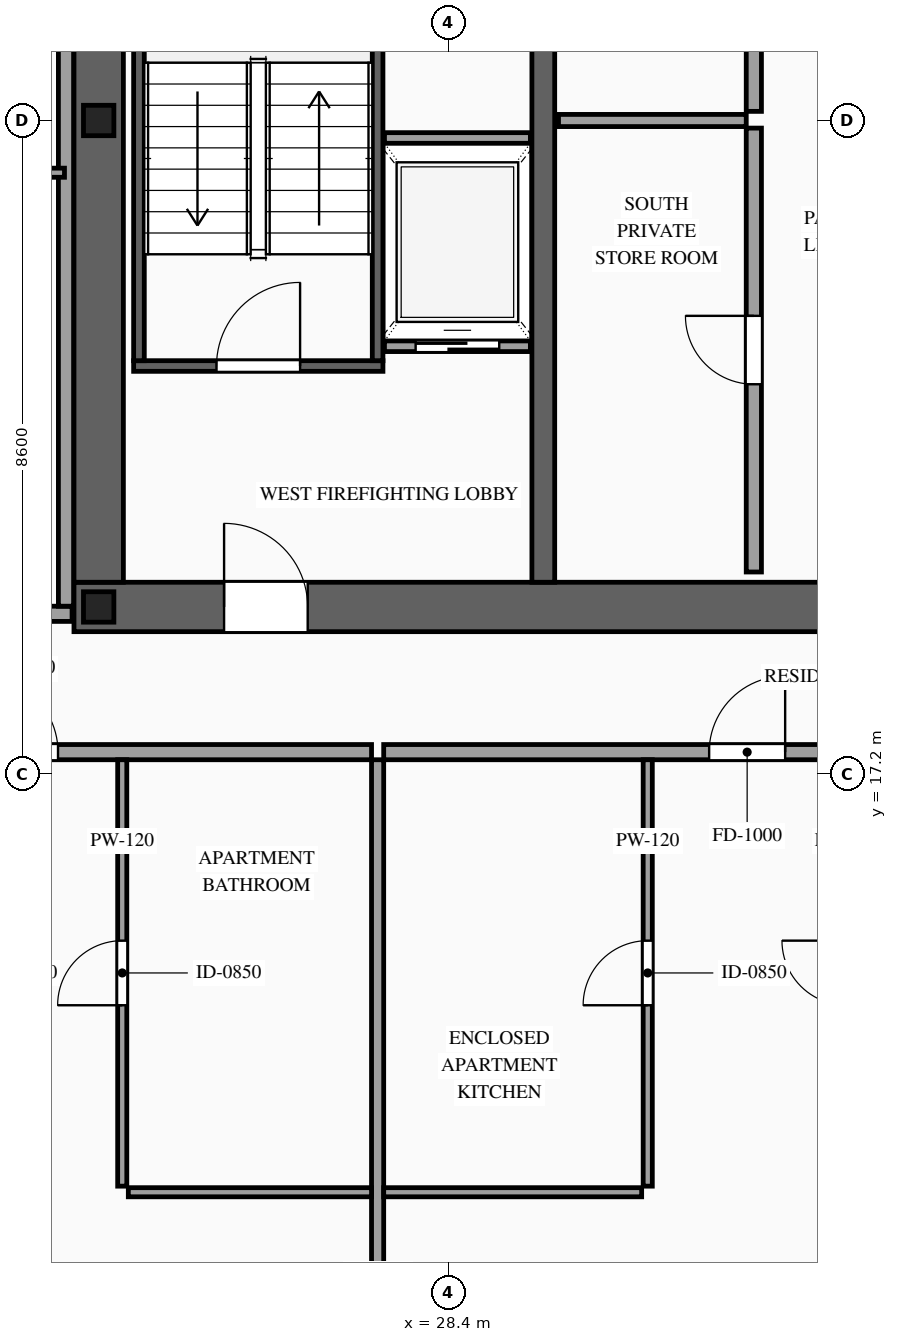
"""IFC4 building model, lengths in metres.
Left out: names, types, materials, properties, quantities, classifications, styles, units other than length and angle.
Written with IfcOpenShell. Run it as: python <this file> out.ifc"""

import sys

from ifc_helpers import new_model, si_unit, direction, frame, frame_2d, origin, origin_2d, place, context, subcontext, project, spatial, rectangle, i_section, extrude, source, transform, mapped, element, fill, save


model = new_model("IFC4")
c1 = context("Model", 3, precision=1e-05, world=origin(), true_north=direction((0.0, 1.0)))
c2 = subcontext(c1, "Body", "Model", "MODEL_VIEW")
j1 = project(units=[si_unit("LENGTHUNIT", "METRE"), si_unit("PLANEANGLEUNIT", "RADIAN")], contexts=[c1])
p1 = place(None, origin())
s1 = spatial("IfcSite", under=j1, at=p1, CompositionType="ELEMENT")
p2 = place(p1, origin())
s2 = spatial("IfcBuilding", under=s1, at=p2, CompositionType="ELEMENT")
p3 = place(p2, frame((0.0, 0.0, 184.5)))
s3 = spatial("IfcBuildingStorey", under=s2, at=p3, CompositionType="ELEMENT", Elevation=184.5)
p4 = place(p3, frame((23.475, 19.4, 0.0), z_axis=(0.0, 0.0, 1.0), x_axis=(1.0, 0.0, 0.0)))
e1 = element("IfcWall", 1, at=p4, inside=s3, PredefinedType="SHEAR", context=c2, shape_type="SweptSolid", body=[
    extrude(rectangle(XDim=27.05, YDim=0.65, at=frame_2d((13.525, 0.0))), origin(), (0.0, 0.0, 1.0), 3.5),
])
p5 = place(p4, frame((1.975, 0.0, 0.0)))
e2 = element("IfcOpeningElement", 2, at=p5, cuts=e1, PredefinedType="OPENING", context=c2, shape_type="SweptSolid", body=[
    extrude(rectangle(XDim=1.1, YDim=2.2, at=frame_2d((0.55, 1.1))), frame((0.0, 0.34, 0.0), z_axis=(0.0, -1.0, 0.0), x_axis=(1.0, 0.0, 0.0)), (0.0, 0.0, 1.0), 0.68),
])
p6 = place(p4, frame((9.875, 0.0, 0.0)))
e3 = element("IfcOpeningElement", 3, at=p6, cuts=e1, PredefinedType="OPENING", context=c2, shape_type="SweptSolid", body=[
    extrude(rectangle(XDim=1.1, YDim=2.2, at=frame_2d((0.55, 1.1))), frame((0.0, 0.34, 0.0), z_axis=(0.0, -1.0, 0.0), x_axis=(1.0, 0.0, 0.0)), (0.0, 0.0, 1.0), 0.68),
])
p7 = place(p4, frame((23.075, 0.0, 0.0)))
e4 = element("IfcOpeningElement", 4, at=p7, cuts=e1, PredefinedType="OPENING", context=c2, shape_type="SweptSolid", body=[
    extrude(rectangle(XDim=1.1, YDim=2.2, at=frame_2d((0.55, 1.1))), frame((0.0, 0.34, 0.0), z_axis=(0.0, -1.0, 0.0), x_axis=(1.0, 0.0, 0.0)), (0.0, 0.0, 1.0), 0.68),
])
p8 = place(p4, frame((19.695, 0.0, 0.0)))
e5 = element("IfcOpeningElement", 5, at=p8, cuts=e1, PredefinedType="OPENING", context=c2, shape_type="SweptSolid", body=[
    extrude(rectangle(XDim=0.9, YDim=2.15, at=frame_2d((0.45, 1.075))), frame((0.0, 0.34, 0.0), z_axis=(0.0, -1.0, 0.0), x_axis=(1.0, 0.0, 0.0)), (0.0, 0.0, 1.0), 0.68),
])
p9 = place(p4, frame((18.255, 0.0, 0.0)))
e6 = element("IfcOpeningElement", 6, at=p9, cuts=e1, PredefinedType="OPENING", context=c2, shape_type="SweptSolid", body=[
    extrude(rectangle(XDim=0.9, YDim=2.15, at=frame_2d((0.45, 1.075))), frame((0.0, 0.34, 0.0), z_axis=(0.0, -1.0, 0.0), x_axis=(1.0, 0.0, 0.0)), (0.0, 0.0, 1.0), 0.68),
])
m1 = source(origin(), c2, "Body", "SweptSolid", [
    extrude(rectangle(XDim=12.15, YDim=0.65, at=frame_2d((6.075, 0.0))), origin(), (0.0, 0.0, 1.0), 3.5),
])
p10 = place(p3, frame((23.8, 19.725, 0.0), z_axis=(0.0, 0.0, 1.0), x_axis=(0.0, 1.0, 0.0)))
e7 = element("IfcWall", 7, at=p10, inside=s3, PredefinedType="SHEAR", context=c2, shape_type="MappedRepresentation", body=[
    mapped(m1, transform((0.0, 0.0, 0.0), scale=1.0)),
])
m2 = source(origin(), c2, "Body", "SweptSolid", [
    extrude(rectangle(XDim=12.15, YDim=0.3, at=frame_2d((6.075, 0.0))), origin(), (0.0, 0.0, 1.0), 3.5),
])
p11 = place(p3, frame((29.65, 19.725, 0.0), z_axis=(0.0, 0.0, 1.0), x_axis=(0.0, 1.0, 0.0)))
e8 = element("IfcWall", 8, at=p11, inside=s3, PredefinedType="SOLIDWALL", context=c2, shape_type="MappedRepresentation", body=[
    mapped(m2, transform((0.0, 0.0, 0.0), scale=1.0)),
])
m3 = source(origin(), c2, "Body", "SweptSolid", [
    extrude(i_section(OverallWidth=0.4, OverallDepth=0.4, WebThickness=0.013, FlangeThickness=0.021, at=origin_2d()), origin(), (0.0, 0.0, 1.0), 3.5),
])
for number, where, z_axis, x_axis in (
    (9, (23.8, 19.4, 0.0), (0.0, 0.0, 1.0), (1.0, 0.0, 0.0)),
    (10, (23.8, 25.8, 0.0), (0.0, 0.0, 1.0), (1.0, 0.0, 0.0)),
):
    element("IfcColumn", number, at=place(p3, frame(where, z_axis=z_axis, x_axis=x_axis)), inside=s3, PredefinedType="COLUMN", context=c2, shape_type="MappedRepresentation", body=[
        mapped(m3, transform((0.0, 0.0, 0.0), scale=1.0)),
    ])
p12 = place(p3, frame((27.56, 22.83, 0.0), z_axis=(0.0, 0.0, 1.0), x_axis=(1.0, 0.0, 0.0)))
e11 = element("IfcWall", 11, at=p12, inside=s3, PredefinedType="SOLIDWALL", context=c2, shape_type="SweptSolid", body=[
    extrude(rectangle(XDim=1.92, YDim=0.14, at=frame_2d((0.96, 0.0))), origin(), (0.0, 0.0, 1.0), 3.28),
])
p13 = place(p12, frame((0.41, 0.0, 0.0)))
e12 = element("IfcOpeningElement", 12, at=p13, cuts=e11, PredefinedType="OPENING", context=c2, shape_type="SweptSolid", body=[
    extrude(rectangle(XDim=1.1, YDim=2.2, at=frame_2d((0.55, 1.1))), frame((0.0, 0.085, 0.0), z_axis=(0.0, -1.0, 0.0), x_axis=(1.0, 0.0, 0.0)), (0.0, 0.0, 1.0), 0.17),
])
m4 = source(origin(), c2, "Body", "SweptSolid", [
    extrude(rectangle(XDim=1.92, YDim=0.14, at=frame_2d((0.96, 0.0))), origin(), (0.0, 0.0, 1.0), 3.28),
])
p14 = place(p3, frame((27.56, 25.57, 0.0), z_axis=(0.0, 0.0, 1.0), x_axis=(1.0, 0.0, 0.0)))
e13 = element("IfcWall", 13, at=p14, inside=s3, PredefinedType="SOLIDWALL", context=c2, shape_type="MappedRepresentation", body=[
    mapped(m4, transform((0.0, 0.0, 0.0), scale=1.0)),
])
p15 = place(p3, frame((24.26, 22.57, 0.0), z_axis=(0.0, 0.0, 1.0), x_axis=(1.0, 0.0, 0.0)))
e14 = element("IfcWall", 14, at=p15, inside=s3, PredefinedType="SOLIDWALL", context=c2, shape_type="SweptSolid", body=[
    extrude(rectangle(XDim=3.28, YDim=0.14, at=frame_2d((1.64, 0.0))), origin(), (0.0, 0.0, 1.0), 3.28),
])
p16 = place(p15, frame((1.09, 0.0, 0.0)))
e15 = element("IfcOpeningElement", 15, at=p16, cuts=e14, PredefinedType="OPENING", context=c2, shape_type="SweptSolid", body=[
    extrude(rectangle(XDim=1.1, YDim=2.2, at=frame_2d((0.55, 1.1))), frame((0.0, 0.085, 0.0), z_axis=(0.0, -1.0, 0.0), x_axis=(1.0, 0.0, 0.0)), (0.0, 0.0, 1.0), 0.17),
])
m5 = source(origin(), c2, "Body", "SweptSolid", [
    extrude(rectangle(XDim=8.94, YDim=0.14, at=frame_2d((4.47, 0.0))), origin(), (0.0, 0.0, 1.0), 3.28),
])
for number, where, z_axis, x_axis in (
    (16, (24.33, 22.64, 0.0), (0.0, 0.0, 1.0), (0.0, 1.0, 0.0)),
    (17, (27.47, 22.64, 0.0), (0.0, 0.0, 1.0), (0.0, 1.0, 0.0)),
):
    element("IfcWall", number, at=place(p3, frame(where, z_axis=z_axis, x_axis=x_axis)), inside=s3, PredefinedType="SOLIDWALL", context=c2, shape_type="MappedRepresentation", body=[
        mapped(m5, transform((0.0, 0.0, 0.0), scale=1.0)),
    ])
p17 = place(p3, frame((32.42, 19.86, 0.0), z_axis=(0.0, 0.0, 1.0), x_axis=(0.0, 1.0, 0.0)))
e18 = element("IfcWall", 18, at=p17, inside=s3, PredefinedType="PARTITIONING", context=c2, shape_type="SweptSolid", body=[
    extrude(rectangle(XDim=5.84, YDim=0.2, at=frame_2d((2.92, 0.0))), origin(), (0.0, 0.0, 1.0), 3.28),
])
p18 = place(p17, frame((2.47, 0.0, 0.0)))
e19 = element("IfcOpeningElement", 19, at=p18, cuts=e18, PredefinedType="OPENING", context=c2, shape_type="SweptSolid", body=[
    extrude(rectangle(XDim=0.9, YDim=2.15, at=frame_2d((0.45, 1.075))), frame((0.0, 0.115, 0.0), z_axis=(0.0, -1.0, 0.0), x_axis=(1.0, 0.0, 0.0)), (0.0, 0.0, 1.0), 0.23),
])
p19 = place(p3, frame((32.42, 25.92, 0.0), z_axis=(0.0, 0.0, 1.0), x_axis=(0.0, 1.0, 0.0)))
e20 = element("IfcWall", 20, at=p19, inside=s3, PredefinedType="PARTITIONING", context=c2, shape_type="SweptSolid", body=[
    extrude(rectangle(XDim=5.82, YDim=0.2, at=frame_2d((2.91, 0.0))), origin(), (0.0, 0.0, 1.0), 3.28),
])
p20 = place(p19, frame((2.46, 0.0, 0.0)))
e21 = element("IfcOpeningElement", 21, at=p20, cuts=e20, PredefinedType="OPENING", context=c2, shape_type="SweptSolid", body=[
    extrude(rectangle(XDim=0.9, YDim=2.15, at=frame_2d((0.45, 1.075))), frame((0.0, 0.115, 0.0), z_axis=(0.0, -1.0, 0.0), x_axis=(1.0, 0.0, 0.0)), (0.0, 0.0, 1.0), 0.23),
])
m6 = source(origin(), c2, "Body", "SweptSolid", [
    extrude(rectangle(XDim=2.47, YDim=0.16, at=frame_2d((1.235, 0.0))), origin(), (0.0, 0.0, 1.0), 3.28),
])
p21 = place(p3, frame((29.85, 25.8, 0.0), z_axis=(0.0, 0.0, 1.0), x_axis=(1.0, 0.0, 0.0)))
e22 = element("IfcWall", 22, at=p21, inside=s3, PredefinedType="PARTITIONING", context=c2, shape_type="MappedRepresentation", body=[
    mapped(m6, transform((0.0, 0.0, 0.0), scale=1.0)),
])
p22 = place(p3, frame((17.94, 17.49, 0.0), z_axis=(0.0, 0.0, 1.0), x_axis=(1.0, 0.0, 0.0)))
e23 = element("IfcWall", 23, at=p22, inside=s3, PredefinedType="PARTITIONING", context=c2, shape_type="SweptSolid", body=[
    extrude(rectangle(XDim=9.45, YDim=0.2, at=frame_2d((4.725, 0.0))), origin(), (0.0, 0.0, 1.0), 3.28),
])
p23 = place(p22, frame((4.325, 0.0, 0.0)))
e24 = element("IfcOpeningElement", 24, at=p23, cuts=e23, PredefinedType="OPENING", context=c2, shape_type="SweptSolid", body=[
    extrude(rectangle(XDim=1.0, YDim=2.2, at=frame_2d((0.5, 1.1))), frame((0.0, 0.115, 0.0), z_axis=(0.0, -1.0, 0.0), x_axis=(1.0, 0.0, 0.0)), (0.0, 0.0, 1.0), 0.23),
])
m7 = source(origin(), c2, "Body", "SweptSolid", [
    extrude(rectangle(XDim=13.54, YDim=0.16, at=frame_2d((6.77, 0.0))), origin(), (0.0, 0.0, 1.0), 3.28),
])
p24 = place(p3, frame((27.47, 3.85, 0.0), z_axis=(0.0, 0.0, 1.0), x_axis=(0.0, 1.0, 0.0)))
e25 = element("IfcWall", 25, at=p24, inside=s3, PredefinedType="PARTITIONING", context=c2, shape_type="MappedRepresentation", body=[
    mapped(m7, transform((0.0, 0.0, 0.0), scale=1.0)),
])
m8 = source(origin(), c2, "Body", "SweptSolid", [
    extrude(rectangle(XDim=3.2, YDim=0.12, at=frame_2d((1.6, 0.0))), origin(), (0.0, 0.0, 1.0), 2.875),
])
p25 = place(p3, frame((24.19, 11.7, 0.0), z_axis=(0.0, 0.0, 1.0), x_axis=(1.0, 0.0, 0.0)))
e26 = element("IfcWall", 26, at=p25, inside=s3, PredefinedType="PARTITIONING", context=c2, shape_type="MappedRepresentation", body=[
    mapped(m8, transform((0.0, 0.0, 0.0), scale=1.0)),
])
p26 = place(p3, frame((24.11, 11.78, 0.0), z_axis=(0.0, 0.0, 1.0), x_axis=(0.0, 1.0, 0.0)))
e27 = element("IfcWall", 27, at=p26, inside=s3, PredefinedType="PARTITIONING", context=c2, shape_type="SweptSolid", body=[
    extrude(rectangle(XDim=5.61, YDim=0.12, at=frame_2d((2.805, 0.0))), origin(), (0.0, 0.0, 1.0), 3.28),
])
p27 = place(p26, frame((2.38, 0.0, 0.0)))
e28 = element("IfcOpeningElement", 28, at=p27, cuts=e27, PredefinedType="OPENING", context=c2, shape_type="SweptSolid", body=[
    extrude(rectangle(XDim=0.85, YDim=2.1, at=frame_2d((0.425, 1.05))), frame((0.0, 0.075, 0.0), z_axis=(0.0, -1.0, 0.0), x_axis=(1.0, 0.0, 0.0)), (0.0, 0.0, 1.0), 0.15),
])
p28 = place(p3, frame((27.55, 17.49, 0.0), z_axis=(0.0, 0.0, 1.0), x_axis=(1.0, 0.0, 0.0)))
e29 = element("IfcWall", 29, at=p28, inside=s3, PredefinedType="PARTITIONING", context=c2, shape_type="SweptSolid", body=[
    extrude(rectangle(XDim=9.37, YDim=0.2, at=frame_2d((4.685, 0.0))), origin(), (0.0, 0.0, 1.0), 3.28),
])
p29 = place(p28, frame((4.282, 0.0, 0.0)))
e30 = element("IfcOpeningElement", 30, at=p29, cuts=e29, PredefinedType="OPENING", context=c2, shape_type="SweptSolid", body=[
    extrude(rectangle(XDim=1.0, YDim=2.2, at=frame_2d((0.5, 1.1))), frame((0.0, 0.115, 0.0), z_axis=(0.0, -1.0, 0.0), x_axis=(1.0, 0.0, 0.0)), (0.0, 0.0, 1.0), 0.23),
])
m9 = source(origin(), c2, "Body", "SweptSolid", [
    extrude(rectangle(XDim=3.394, YDim=0.12, at=frame_2d((1.697, 0.0))), origin(), (0.0, 0.0, 1.0), 2.875),
])
p30 = place(p3, frame((27.55, 11.7, 0.0), z_axis=(0.0, 0.0, 1.0), x_axis=(1.0, 0.0, 0.0)))
e31 = element("IfcWall", 31, at=p30, inside=s3, PredefinedType="PARTITIONING", context=c2, shape_type="MappedRepresentation", body=[
    mapped(m9, transform((0.0, 0.0, 0.0), scale=1.0)),
])
p31 = place(p3, frame((31.024, 11.78, 0.0), z_axis=(0.0, 0.0, 1.0), x_axis=(0.0, 1.0, 0.0)))
e32 = element("IfcWall", 32, at=p31, inside=s3, PredefinedType="PARTITIONING", context=c2, shape_type="SweptSolid", body=[
    extrude(rectangle(XDim=5.61, YDim=0.12, at=frame_2d((2.805, 0.0))), origin(), (0.0, 0.0, 1.0), 3.28),
])
p32 = place(p31, frame((2.38, 0.0, 0.0)))
e33 = element("IfcOpeningElement", 33, at=p32, cuts=e32, PredefinedType="OPENING", context=c2, shape_type="SweptSolid", body=[
    extrude(rectangle(XDim=0.85, YDim=2.1, at=frame_2d((0.425, 1.05))), frame((0.0, 0.075, 0.0), z_axis=(0.0, -1.0, 0.0), x_axis=(1.0, 0.0, 0.0)), (0.0, 0.0, 1.0), 0.15),
])
m10 = source(origin(), c2, "Body", "SweptSolid", [
    extrude(rectangle(XDim=8.4, YDim=0.2, at=frame_2d((4.2, 0.0))), origin(), (0.0, 0.0, 1.0), 2.775),
])
p33 = place(p3, frame((15.05, 19.31, 0.0), z_axis=(0.0, 0.0, 1.0), x_axis=(1.0, 0.0, 0.0)))
e34 = element("IfcWall", 34, at=p33, inside=s3, PredefinedType="PARTITIONING", context=c2, shape_type="MappedRepresentation", body=[
    mapped(m10, transform((0.0, 0.0, 0.0), scale=1.0)),
])
m11 = source(origin(), c2, "Body", "SweptSolid", [
    extrude(rectangle(XDim=12.78, YDim=0.2, at=frame_2d((6.39, 0.0))), origin(), (0.0, 0.0, 1.0), 3.28),
])
p34 = place(p3, frame((23.37, 19.41, 0.0), z_axis=(0.0, 0.0, 1.0), x_axis=(0.0, 1.0, 0.0)))
e35 = element("IfcWall", 35, at=p34, inside=s3, PredefinedType="PARTITIONING", context=c2, shape_type="MappedRepresentation", body=[
    mapped(m11, transform((0.0, 0.0, 0.0), scale=1.0)),
])
m12 = source(origin(), c2, "Body", "SweptSolid", [
    extrude(rectangle(XDim=2.75, YDim=0.12, at=frame_2d((1.375, 0.0))), origin(), (0.0, 0.0, 1.0), 3.28),
])
p35 = place(p3, frame((20.6, 25.113, 0.0), z_axis=(0.0, 0.0, 1.0), x_axis=(1.0, 0.0, 0.0)))
e36 = element("IfcWall", 36, at=p35, inside=s3, PredefinedType="PARTITIONING", context=c2, shape_type="MappedRepresentation", body=[
    mapped(m12, transform((0.0, 0.0, 0.0), scale=1.0)),
])
m13 = source(origin(), c2, "Body", "SweptSolid", [
    extrude(rectangle(XDim=1.1, YDim=2.2, at=frame_2d((0.55, 1.1))), frame((0.0, 0.025, 0.0), z_axis=(0.0, -1.0, 0.0), x_axis=(1.0, 0.0, 0.0)), (0.0, 0.0, 1.0), 0.05),
])
p36 = place(p13, origin())
e37 = element("IfcDoor", 37, at=p36, inside=s3, OperationType="SLIDING_TO_LEFT", PredefinedType="DOOR", context=c2, shape_type="MappedRepresentation", body=[
    mapped(m13, transform((0.0, 0.0, 0.0), scale=1.0)),
])
fill(e12, e37)
m14 = source(origin(), c2, "Body", "SweptSolid", [
    extrude(rectangle(XDim=1.1, YDim=2.2, at=frame_2d((0.55, 1.1))), frame((0.0, 0.025, 0.0), z_axis=(0.0, -1.0, 0.0), x_axis=(1.0, 0.0, 0.0)), (0.0, 0.0, 1.0), 0.05),
])
p37 = place(p16, origin())
e38 = element("IfcDoor", 38, at=p37, inside=s3, OperationType="SINGLE_SWING_RIGHT", PredefinedType="DOOR", context=c2, shape_type="MappedRepresentation", body=[
    mapped(m14, transform((0.0, 0.0, 0.0), scale=1.0)),
])
fill(e15, e38)
p38 = place(p5, origin())
e39 = element("IfcDoor", 39, at=p38, inside=s3, OperationType="SINGLE_SWING_LEFT", PredefinedType="DOOR", context=c2, shape_type="MappedRepresentation", body=[
    mapped(m14, transform((0.0, 0.0, 0.0), scale=1.0)),
])
fill(e2, e39)
m15 = source(origin(), c2, "Body", "SweptSolid", [
    extrude(rectangle(XDim=0.9, YDim=2.15, at=frame_2d((0.45, 1.075))), frame((0.0, 0.025, 0.0), z_axis=(0.0, -1.0, 0.0), x_axis=(1.0, 0.0, 0.0)), (0.0, 0.0, 1.0), 0.05),
])
p39 = place(p18, origin())
e40 = element("IfcDoor", 40, at=p39, inside=s3, OperationType="SINGLE_SWING_RIGHT", PredefinedType="DOOR", context=c2, shape_type="MappedRepresentation", body=[
    mapped(m15, transform((0.0, 0.0, 0.0), scale=1.0)),
])
fill(e19, e40)
m16 = source(origin(), c2, "Body", "SweptSolid", [
    extrude(rectangle(XDim=1.0, YDim=2.2, at=frame_2d((0.5, 1.1))), frame((0.0, 0.025, 0.0), z_axis=(0.0, -1.0, 0.0), x_axis=(1.0, 0.0, 0.0)), (0.0, 0.0, 1.0), 0.05),
])
p40 = place(p23, origin())
e41 = element("IfcDoor", 41, at=p40, inside=s3, OperationType="SINGLE_SWING_LEFT", PredefinedType="DOOR", context=c2, shape_type="MappedRepresentation", body=[
    mapped(m16, transform((0.0, 0.0, 0.0), scale=1.0)),
])
fill(e24, e41)
m17 = source(origin(), c2, "Body", "SweptSolid", [
    extrude(rectangle(XDim=0.85, YDim=2.1, at=frame_2d((0.425, 1.05))), frame((0.0, 0.025, 0.0), z_axis=(0.0, -1.0, 0.0), x_axis=(1.0, 0.0, 0.0)), (0.0, 0.0, 1.0), 0.05),
])
p41 = place(p27, origin())
e42 = element("IfcDoor", 42, at=p41, inside=s3, OperationType="SINGLE_SWING_LEFT", PredefinedType="DOOR", context=c2, shape_type="MappedRepresentation", body=[
    mapped(m17, transform((0.0, 0.0, 0.0), scale=1.0)),
])
fill(e28, e42)
p42 = place(p29, origin())
e43 = element("IfcDoor", 43, at=p42, inside=s3, OperationType="SINGLE_SWING_RIGHT", PredefinedType="DOOR", context=c2, shape_type="MappedRepresentation", body=[
    mapped(m16, transform((0.0, 0.0, 0.0), scale=1.0)),
])
fill(e30, e43)
p43 = place(p32, origin())
e44 = element("IfcDoor", 44, at=p43, inside=s3, OperationType="SINGLE_SWING_LEFT", PredefinedType="DOOR", context=c2, shape_type="MappedRepresentation", body=[
    mapped(m17, transform((0.0, 0.0, 0.0), scale=1.0)),
])
fill(e33, e44)
save(model, sys.argv[1])
